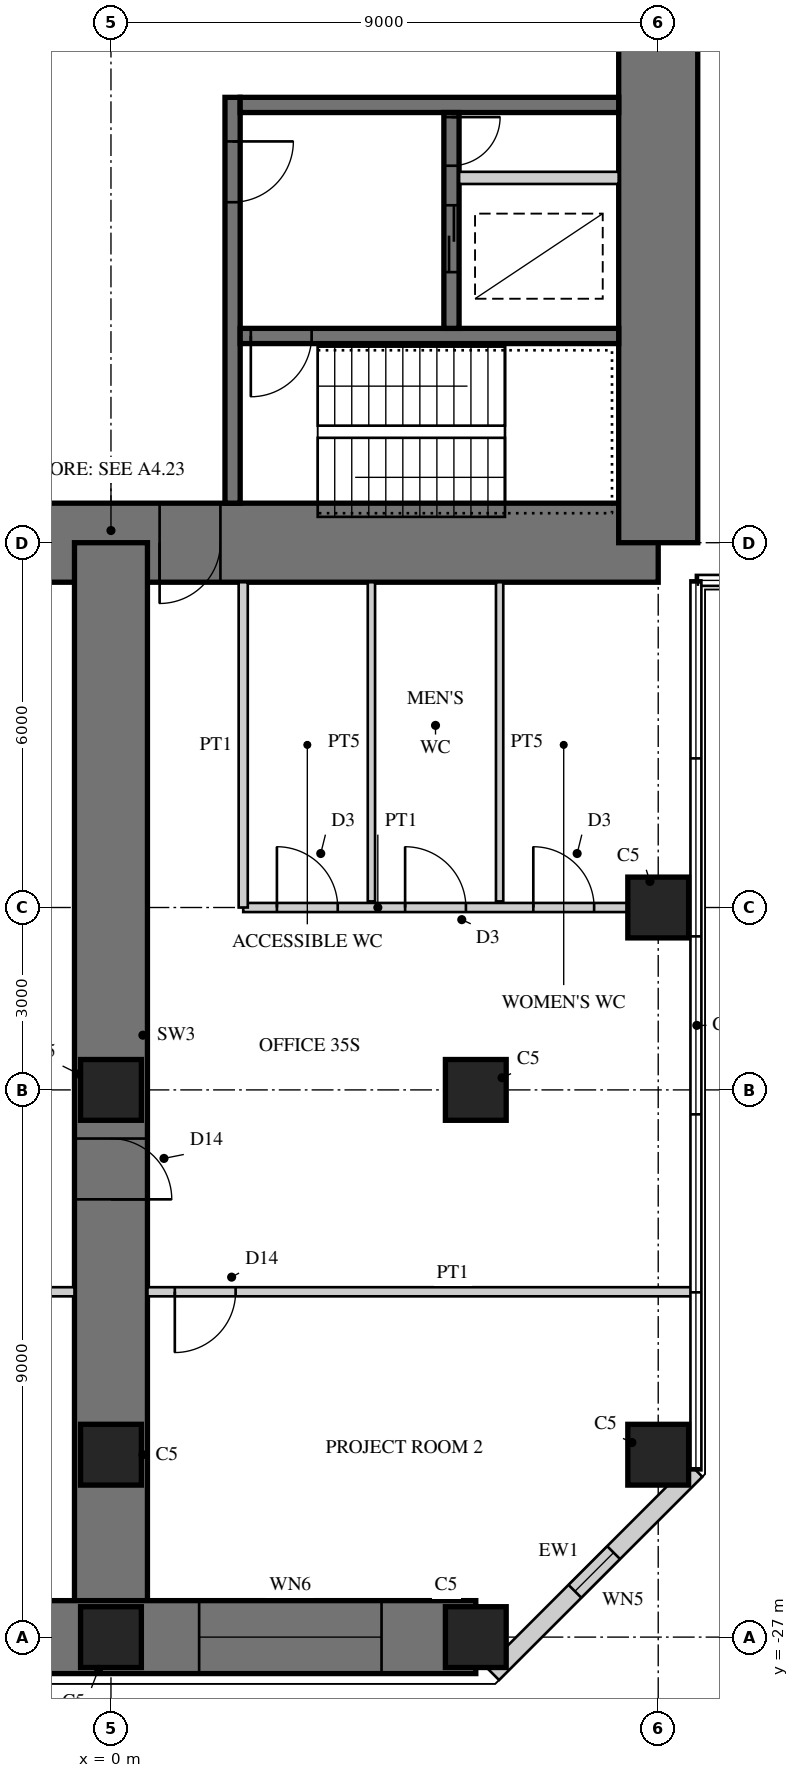
"""IFC4 building model, lengths in metres.
Left out: names, types, materials, properties, quantities, classifications, styles, units other than length and angle.
Written with IfcOpenShell. Run it as: python <this file> out.ifc"""

import sys

from ifc_helpers import new_model, si_unit, direction, frame, frame_2d, origin, origin_2d, place, context, subcontext, project, spatial, rectangle, hollow_rectangle, extrude, element, fill, save


model = new_model("IFC4")
c1 = context("Model", 3, precision=1e-05, world=origin(), true_north=direction((0.0, 1.0)))
c2 = subcontext(c1, "Body", "Model", "MODEL_VIEW")
j1 = project(units=[si_unit("LENGTHUNIT", "METRE"), si_unit("PLANEANGLEUNIT", "RADIAN")], contexts=[c1])
p1 = place(None, origin())
s1 = spatial("IfcSite", under=j1, at=p1, CompositionType="ELEMENT")
p2 = place(p1, origin())
s2 = spatial("IfcBuilding", under=s1, at=p2, CompositionType="ELEMENT")
p3 = place(p2, frame((0.0, 0.0, 144.5)))
s3 = spatial("IfcBuildingStorey", under=s2, at=p3, CompositionType="ELEMENT", Elevation=144.5)
p4 = place(p3, frame((-9.0, -9.0, 0.0), z_axis=(0.0, 0.0, 1.0), x_axis=(1.0, 0.0, 0.0)))
e1 = element("IfcWall", 1, at=p4, inside=s3, PredefinedType="SHEAR", context=c2, shape_type="SweptSolid", body=[
    extrude(rectangle(XDim=18.0, YDim=1.3, at=frame_2d((9.0, 0.0))), origin(), (0.0, 0.0, 1.0), 4.0),
])
p5 = place(p4, frame((9.8, 0.0, 0.0)))
e2 = element("IfcOpeningElement", 2, at=p5, cuts=e1, PredefinedType="OPENING", context=c2, shape_type="SweptSolid", body=[
    extrude(rectangle(XDim=1.0, YDim=2.4, at=frame_2d((0.5, 1.2))), frame((0.0, 0.66, 0.0), z_axis=(0.0, -1.0, 0.0), x_axis=(1.0, 0.0, 0.0)), (0.0, 0.0, 1.0), 1.32),
])
p6 = place(p3, frame((9.0, -9.0, 0.0), z_axis=(0.0, 0.0, 1.0), x_axis=(0.0, 1.0, 0.0)))
e3 = element("IfcWall", 3, at=p6, inside=s3, PredefinedType="SHEAR", context=c2, shape_type="SweptSolid", body=[
    extrude(rectangle(XDim=18.0, YDim=1.3, at=frame_2d((9.0, 0.0))), origin(), (0.0, 0.0, 1.0), 4.0),
])
p7 = place(p6, frame((9.8, 0.0, 0.0)))
e4 = element("IfcOpeningElement", 4, at=p7, cuts=e3, PredefinedType="OPENING", context=c2, shape_type="SweptSolid", body=[
    extrude(rectangle(XDim=1.0, YDim=2.4, at=frame_2d((0.5, 1.2))), frame((0.0, 0.66, 0.0), z_axis=(0.0, -1.0, 0.0), x_axis=(1.0, 0.0, 0.0)), (0.0, 0.0, 1.0), 1.32),
])
p8 = place(p3, frame((2.0, -1.675, 0.0), z_axis=(0.0, 0.0, 1.0), x_axis=(0.0, -1.0, 0.0)))
e5 = element("IfcWall", 5, at=p8, inside=s3, PredefinedType="SHEAR", context=c2, shape_type="SweptSolid", body=[
    extrude(rectangle(XDim=6.675, YDim=0.25, at=frame_2d((3.337, 0.0))), origin(), (0.0, 0.0, 1.0), 4.0),
])
p9 = place(p8, frame((0.725, 0.0, 0.0)))
e6 = element("IfcOpeningElement", 6, at=p9, cuts=e5, PredefinedType="OPENING", context=c2, shape_type="SweptSolid", body=[
    extrude(rectangle(XDim=1.0, YDim=2.1, at=frame_2d((0.5, 1.05))), frame((0.0, 0.135, 0.0), z_axis=(0.0, -1.0, 0.0), x_axis=(1.0, 0.0, 0.0)), (0.0, 0.0, 1.0), 0.27),
])
p10 = place(p3, frame((2.125, -1.8, 0.0), z_axis=(0.0, 0.0, 1.0), x_axis=(1.0, 0.0, 0.0)))
e7 = element("IfcWall", 7, at=p10, inside=s3, PredefinedType="SHEAR", context=c2, shape_type="SweptSolid", body=[
    extrude(rectangle(XDim=6.225, YDim=0.25, at=frame_2d((3.113, 0.0))), origin(), (0.0, 0.0, 1.0), 4.0),
])
p11 = place(p3, frame((2.125, -5.6, 0.0), z_axis=(0.0, 0.0, 1.0), x_axis=(1.0, 0.0, 0.0)))
e8 = element("IfcWall", 8, at=p11, inside=s3, PredefinedType="SHEAR", context=c2, shape_type="SweptSolid", body=[
    extrude(rectangle(XDim=6.225, YDim=0.25, at=frame_2d((3.113, 0.0))), origin(), (0.0, 0.0, 1.0), 4.0),
])
p12 = place(p11, frame((0.175, 0.0, 0.0)))
e9 = element("IfcOpeningElement", 9, at=p12, cuts=e8, PredefinedType="OPENING", context=c2, shape_type="SweptSolid", body=[
    extrude(rectangle(XDim=1.0, YDim=2.1, at=frame_2d((0.5, 1.05))), frame((0.0, 0.135, 0.0), z_axis=(0.0, -1.0, 0.0), x_axis=(1.0, 0.0, 0.0)), (0.0, 0.0, 1.0), 0.27),
])
p13 = place(p3, frame((5.6, -1.925, 0.0), z_axis=(0.0, 0.0, 1.0), x_axis=(0.0, -1.0, 0.0)))
e10 = element("IfcWall", 10, at=p13, inside=s3, PredefinedType="SHEAR", context=c2, shape_type="SweptSolid", body=[
    extrude(rectangle(XDim=3.55, YDim=0.25, at=frame_2d((1.775, 0.0))), origin(), (0.0, 0.0, 1.0), 4.0),
])
p14 = place(p13, frame((1.525, 0.0, 0.0)))
e11 = element("IfcOpeningElement", 11, at=p14, cuts=e10, PredefinedType="OPENING", context=c2, shape_type="SweptSolid", body=[
    extrude(rectangle(XDim=1.1, YDim=2.2, at=frame_2d((0.55, 1.1))), frame((0.0, 0.135, 0.0), z_axis=(0.0, -1.0, 0.0), x_axis=(1.0, 0.0, 0.0)), (0.0, 0.0, 1.0), 0.27),
])
p15 = place(p13, frame((0.075, 0.0, 0.0)))
e12 = element("IfcOpeningElement", 12, at=p15, cuts=e10, PredefinedType="OPENING", context=c2, shape_type="SweptSolid", body=[
    extrude(rectangle(XDim=0.8, YDim=2.1, at=frame_2d((0.4, 1.05))), frame((0.0, 0.135, 0.0), z_axis=(0.0, -1.0, 0.0), x_axis=(1.0, 0.0, 0.0)), (0.0, 0.0, 1.0), 0.27),
])
p16 = place(p3, frame((5.725, -3.0, 0.0), z_axis=(0.0, 0.0, 1.0), x_axis=(1.0, 0.0, 0.0)))
e13 = element("IfcWall", 13, at=p16, inside=s3, PredefinedType="PARTITIONING", context=c2, shape_type="SweptSolid", body=[
    extrude(rectangle(XDim=2.625, YDim=0.2, at=frame_2d((1.312, 0.0))), origin(), (0.0, 0.0, 1.0), 4.0),
])
p17 = place(p3, frame((0.0, -9.0, 0.0), z_axis=(0.0, 0.0, 1.0), x_axis=(0.0, -1.0, 0.0)))
e14 = element("IfcWall", 14, at=p17, inside=s3, PredefinedType="SHEAR", context=c2, shape_type="SweptSolid", body=[
    extrude(rectangle(XDim=18.0, YDim=1.2, at=frame_2d((9.0, 0.0))), origin(), (0.0, 0.0, 1.0), 4.0),
])
p18 = place(p17, frame((9.8, 0.0, 0.0)))
e15 = element("IfcOpeningElement", 15, at=p18, cuts=e14, PredefinedType="OPENING", context=c2, shape_type="SweptSolid", body=[
    extrude(rectangle(XDim=1.0, YDim=2.2, at=frame_2d((0.5, 1.1))), frame((0.0, 0.61, 0.0), z_axis=(0.0, -1.0, 0.0), x_axis=(1.0, 0.0, 0.0)), (0.0, 0.0, 1.0), 1.22),
])
p19 = place(p3, frame((-6.0, -27.0, 0.0), z_axis=(0.0, 0.0, 1.0), x_axis=(1.0, 0.0, 0.0)))
e16 = element("IfcWall", 16, at=p19, inside=s3, PredefinedType="SHEAR", context=c2, shape_type="SweptSolid", body=[
    extrude(rectangle(XDim=12.0, YDim=1.2, at=frame_2d((6.0, 0.0))), origin(), (0.0, 0.0, 1.0), 4.0),
])
p20 = place(p19, frame((1.55, 0.0, 0.6)))
e17 = element("IfcOpeningElement", 17, at=p20, cuts=e16, PredefinedType="OPENING", context=c2, shape_type="SweptSolid", body=[
    extrude(rectangle(XDim=3.0, YDim=2.4, at=frame_2d((1.5, 1.2))), frame((0.0, 0.61, 0.0), z_axis=(0.0, -1.0, 0.0), x_axis=(1.0, 0.0, 0.0)), (0.0, 0.0, 1.0), 1.22),
])
p21 = place(p19, frame((7.45, 0.0, 0.6)))
e18 = element("IfcOpeningElement", 18, at=p21, cuts=e16, PredefinedType="OPENING", context=c2, shape_type="SweptSolid", body=[
    extrude(rectangle(XDim=3.0, YDim=2.4, at=frame_2d((1.5, 1.2))), frame((0.0, 0.61, 0.0), z_axis=(0.0, -1.0, 0.0), x_axis=(1.0, 0.0, 0.0)), (0.0, 0.0, 1.0), 1.22),
])
for number, where, z_axis, x_axis in (
    (19, (9.0, -15.0, 0.0), (0.0, 0.0, 1.0), (1.0, 0.0, 0.0)),
    (20, (9.0, -24.0, 0.0), (0.0, 0.0, 1.0), (1.0, 0.0, 0.0)),
    (21, (0.0, -27.0, 0.0), (0.0, 0.0, 1.0), (1.0, 0.0, 0.0)),
    (22, (6.0, -27.0, 0.0), (0.0, 0.0, 1.0), (1.0, 0.0, 0.0)),
    (23, (0.0, -18.0, 0.0), (0.0, 0.0, 1.0), (1.0, 0.0, 0.0)),
    (24, (6.0, -18.0, 0.0), (0.0, 0.0, 1.0), (1.0, 0.0, 0.0)),
    (25, (0.0, -24.0, 0.0), (0.0, 0.0, 1.0), (1.0, 0.0, 0.0)),
):
    element("IfcColumn", number, at=place(p3, frame(where, z_axis=z_axis, x_axis=x_axis)), inside=s3, PredefinedType="COLUMN", context=c2, shape_type="SweptSolid", body=[
        extrude(rectangle(XDim=1.0, YDim=1.0, at=origin_2d()), origin(), (0.0, 0.0, 1.0), 4.0),
    ])
p22 = place(p3, frame((6.277, -27.6, 0.0), z_axis=(0.0, 0.0, 1.0), x_axis=(0.707106781187, 0.707106781187, 0.0)))
e26 = element("IfcWall", 26, at=p22, inside=s3, PredefinedType="SOLIDWALL", context=c2, shape_type="SweptSolid", body=[
    extrude(rectangle(XDim=4.728, YDim=0.3, at=frame_2d((2.364, 0.0))), origin(), (0.0, 0.0, 1.0), 3.8),
])
p23 = place(p22, frame((1.914, 0.0, 0.3)))
e27 = element("IfcOpeningElement", 27, at=p23, cuts=e26, PredefinedType="OPENING", context=c2, shape_type="SweptSolid", body=[
    extrude(rectangle(XDim=0.9, YDim=2.4, at=frame_2d((0.45, 1.2))), frame((0.0, 0.16, 0.0), z_axis=(0.0, -1.0, 0.0), x_axis=(1.0, 0.0, 0.0)), (0.0, 0.0, 1.0), 0.32),
])
p24 = place(p3, frame((2.175, -15.0, 0.0), z_axis=(0.0, 0.0, 1.0), x_axis=(1.0, 0.0, 0.0)))
e28 = element("IfcWall", 28, at=p24, inside=s3, PredefinedType="PARTITIONING", context=c2, shape_type="SweptSolid", body=[
    extrude(rectangle(XDim=6.325, YDim=0.15, at=frame_2d((3.163, 0.0))), origin(), (0.0, 0.0, 1.0), 3.0),
])
p25 = place(p24, frame((0.554, 0.0, 0.0)))
e29 = element("IfcOpeningElement", 29, at=p25, cuts=e28, PredefinedType="OPENING", context=c2, shape_type="SweptSolid", body=[
    extrude(rectangle(XDim=1.0, YDim=2.1, at=frame_2d((0.5, 1.05))), frame((0.0, 0.085, 0.0), z_axis=(0.0, -1.0, 0.0), x_axis=(1.0, 0.0, 0.0)), (0.0, 0.0, 1.0), 0.17),
])
p26 = place(p24, frame((2.663, 0.0, 0.0)))
e30 = element("IfcOpeningElement", 30, at=p26, cuts=e28, PredefinedType="OPENING", context=c2, shape_type="SweptSolid", body=[
    extrude(rectangle(XDim=1.0, YDim=2.1, at=frame_2d((0.5, 1.05))), frame((0.0, 0.085, 0.0), z_axis=(0.0, -1.0, 0.0), x_axis=(1.0, 0.0, 0.0)), (0.0, 0.0, 1.0), 0.17),
])
p27 = place(p24, frame((4.771, 0.0, 0.0)))
e31 = element("IfcOpeningElement", 31, at=p27, cuts=e28, PredefinedType="OPENING", context=c2, shape_type="SweptSolid", body=[
    extrude(rectangle(XDim=1.0, YDim=2.1, at=frame_2d((0.5, 1.05))), frame((0.0, 0.085, 0.0), z_axis=(0.0, -1.0, 0.0), x_axis=(1.0, 0.0, 0.0)), (0.0, 0.0, 1.0), 0.17),
])
p28 = place(p3, frame((2.175, -9.65, 0.0), z_axis=(0.0, 0.0, 1.0), x_axis=(0.0, -1.0, 0.0)))
e32 = element("IfcWall", 32, at=p28, inside=s3, PredefinedType="PARTITIONING", context=c2, shape_type="SweptSolid", body=[
    extrude(rectangle(XDim=5.35, YDim=0.15, at=frame_2d((2.675, 0.0))), origin(), (0.0, 0.0, 1.0), 3.8),
])
for number, where, z_axis, x_axis in (
    (33, (4.283, -9.65, 0.0), (0.0, 0.0, 1.0), (0.0, -1.0, 0.0)),
    (34, (6.392, -9.65, 0.0), (0.0, 0.0, 1.0), (0.0, -1.0, 0.0)),
):
    element("IfcWall", number, at=place(p3, frame(where, z_axis=z_axis, x_axis=x_axis)), inside=s3, PredefinedType="PLUMBINGWALL", context=c2, shape_type="SweptSolid", body=[
        extrude(rectangle(XDim=5.25, YDim=0.12, at=frame_2d((2.625, 0.0))), origin(), (0.0, 0.0, 1.0), 3.8),
    ])
p29 = place(p3, frame((0.6, -21.32, 0.0), z_axis=(0.0, 0.0, 1.0), x_axis=(1.0, 0.0, 0.0)))
e35 = element("IfcWall", 35, at=p29, inside=s3, PredefinedType="PARTITIONING", context=c2, shape_type="SweptSolid", body=[
    extrude(rectangle(XDim=8.98, YDim=0.15, at=frame_2d((4.49, 0.0))), origin(), (0.0, 0.0, 1.0), 3.8),
])
p30 = place(p29, frame((0.45, 0.0, 0.0)))
e36 = element("IfcOpeningElement", 36, at=p30, cuts=e35, PredefinedType="OPENING", context=c2, shape_type="SweptSolid", body=[
    extrude(rectangle(XDim=1.0, YDim=2.2, at=frame_2d((0.5, 1.1))), frame((0.0, 0.085, 0.0), z_axis=(0.0, -1.0, 0.0), x_axis=(1.0, 0.0, 0.0)), (0.0, 0.0, 1.0), 0.17),
])
p31 = place(p3, frame((-9.58, -21.32, 0.0), z_axis=(0.0, 0.0, 1.0), x_axis=(1.0, 0.0, 0.0)))
e37 = element("IfcWall", 37, at=p31, inside=s3, PredefinedType="PARTITIONING", context=c2, shape_type="SweptSolid", body=[
    extrude(rectangle(XDim=8.98, YDim=0.15, at=frame_2d((4.49, 0.0))), origin(), (0.0, 0.0, 1.0), 3.8),
])
p32 = place(p31, frame((7.53, 0.0, 0.0)))
e38 = element("IfcOpeningElement", 38, at=p32, cuts=e37, PredefinedType="OPENING", context=c2, shape_type="SweptSolid", body=[
    extrude(rectangle(XDim=1.0, YDim=2.2, at=frame_2d((0.5, 1.1))), frame((0.0, 0.085, 0.0), z_axis=(0.0, -1.0, 0.0), x_axis=(1.0, 0.0, 0.0)), (0.0, 0.0, 1.0), 0.17),
])
p33 = place(p21, origin())
e39 = element("IfcWindow", 39, at=p33, inside=s3, PartitioningType="SINGLE_PANEL", PredefinedType="WINDOW", context=c2, shape_type="SweptSolid", body=[
    extrude(hollow_rectangle(XDim=3.0, YDim=2.4, WallThickness=0.06, at=frame_2d((1.5, 1.2))), frame((0.0, 0.03, 0.0), z_axis=(0.0, -1.0, 0.0), x_axis=(1.0, 0.0, 0.0)), (0.0, 0.0, 1.0), 0.06),
    extrude(rectangle(XDim=2.879, YDim=2.279, at=frame_2d((1.5, 1.2))), frame((0.0, 0.03, 0.0), z_axis=(0.0, -1.0, 0.0), x_axis=(1.0, 0.0, 0.0)), (0.0, 0.0, 1.0), 0.06),
])
fill(e18, e39)
p34 = place(p23, origin())
e40 = element("IfcWindow", 40, at=p34, inside=s3, PartitioningType="SINGLE_PANEL", PredefinedType="WINDOW", context=c2, shape_type="SweptSolid", body=[
    extrude(hollow_rectangle(XDim=0.9, YDim=2.4, WallThickness=0.06, at=frame_2d((0.45, 1.2))), frame((0.0, 0.03, 0.0), z_axis=(0.0, -1.0, 0.0), x_axis=(1.0, 0.0, 0.0)), (0.0, 0.0, 1.0), 0.06),
    extrude(rectangle(XDim=0.779, YDim=2.279, at=frame_2d((0.45, 1.2))), frame((0.0, 0.03, 0.0), z_axis=(0.0, -1.0, 0.0), x_axis=(1.0, 0.0, 0.0)), (0.0, 0.0, 1.0), 0.06),
])
fill(e27, e40)
p35 = place(p25, origin())
e41 = element("IfcDoor", 41, at=p35, inside=s3, OperationType="SINGLE_SWING_LEFT", PredefinedType="DOOR", context=c2, shape_type="SweptSolid", body=[
    extrude(rectangle(XDim=1.0, YDim=2.1, at=frame_2d((0.5, 1.05))), frame((0.0, 0.025, 0.0), z_axis=(0.0, -1.0, 0.0), x_axis=(1.0, 0.0, 0.0)), (0.0, 0.0, 1.0), 0.05),
])
fill(e29, e41)
p36 = place(p26, origin())
e42 = element("IfcDoor", 42, at=p36, inside=s3, OperationType="SINGLE_SWING_LEFT", PredefinedType="DOOR", context=c2, shape_type="SweptSolid", body=[
    extrude(rectangle(XDim=1.0, YDim=2.1, at=frame_2d((0.5, 1.05))), frame((0.0, 0.025, 0.0), z_axis=(0.0, -1.0, 0.0), x_axis=(1.0, 0.0, 0.0)), (0.0, 0.0, 1.0), 0.05),
])
fill(e30, e42)
p37 = place(p27, origin())
e43 = element("IfcDoor", 43, at=p37, inside=s3, OperationType="SINGLE_SWING_LEFT", PredefinedType="DOOR", context=c2, shape_type="SweptSolid", body=[
    extrude(rectangle(XDim=1.0, YDim=2.1, at=frame_2d((0.5, 1.05))), frame((0.0, 0.025, 0.0), z_axis=(0.0, -1.0, 0.0), x_axis=(1.0, 0.0, 0.0)), (0.0, 0.0, 1.0), 0.05),
])
fill(e31, e43)
p38 = place(p30, frame((1.0, 0.0, 0.0), z_axis=(0.0, 0.0, 1.0), x_axis=(-1.0, 0.0, 0.0)))
e44 = element("IfcDoor", 44, at=p38, inside=s3, OperationType="SINGLE_SWING_RIGHT", PredefinedType="DOOR", context=c2, shape_type="SweptSolid", body=[
    extrude(rectangle(XDim=1.0, YDim=2.2, at=frame_2d((0.5, 1.1))), frame((0.0, 0.025, 0.0), z_axis=(0.0, -1.0, 0.0), x_axis=(1.0, 0.0, 0.0)), (0.0, 0.0, 1.0), 0.05),
])
fill(e36, e44)
p39 = place(p18, origin())
e45 = element("IfcDoor", 45, at=p39, inside=s3, OperationType="SINGLE_SWING_RIGHT", PredefinedType="DOOR", context=c2, shape_type="SweptSolid", body=[
    extrude(rectangle(XDim=1.0, YDim=2.2, at=frame_2d((0.5, 1.1))), frame((0.0, 0.025, 0.0), z_axis=(0.0, -1.0, 0.0), x_axis=(1.0, 0.0, 0.0)), (0.0, 0.0, 1.0), 0.05),
])
fill(e15, e45)
p40 = place(p5, frame((1.0, 0.0, 0.0), z_axis=(0.0, 0.0, 1.0), x_axis=(-1.0, 0.0, 0.0)))
e46 = element("IfcDoor", 46, at=p40, inside=s3, OperationType="SINGLE_SWING_RIGHT", PredefinedType="DOOR", context=c2, shape_type="SweptSolid", body=[
    extrude(rectangle(XDim=1.0, YDim=2.4, at=frame_2d((0.5, 1.2))), frame((0.0, -0.005, 0.0), z_axis=(0.0, -1.0, 0.0), x_axis=(1.0, 0.0, 0.0)), (0.0, 0.0, 1.0), 0.05),
])
fill(e2, e46)
p41 = place(p9, origin())
e47 = element("IfcDoor", 47, at=p41, inside=s3, OperationType="SINGLE_SWING_LEFT", PredefinedType="DOOR", context=c2, shape_type="SweptSolid", body=[
    extrude(rectangle(XDim=1.0, YDim=2.1, at=frame_2d((0.5, 1.05))), frame((0.0, 0.025, 0.0), z_axis=(0.0, -1.0, 0.0), x_axis=(1.0, 0.0, 0.0)), (0.0, 0.0, 1.0), 0.05),
])
fill(e6, e47)
p42 = place(p12, frame((1.0, 0.0, 0.0), z_axis=(0.0, 0.0, 1.0), x_axis=(-1.0, 0.0, 0.0)))
e48 = element("IfcDoor", 48, at=p42, inside=s3, OperationType="SINGLE_SWING_RIGHT", PredefinedType="DOOR", context=c2, shape_type="SweptSolid", body=[
    extrude(rectangle(XDim=1.0, YDim=2.1, at=frame_2d((0.5, 1.05))), frame((0.0, 0.025, 0.0), z_axis=(0.0, -1.0, 0.0), x_axis=(1.0, 0.0, 0.0)), (0.0, 0.0, 1.0), 0.05),
])
fill(e9, e48)
p43 = place(p14, origin())
e49 = element("IfcDoor", 49, at=p43, inside=s3, OperationType="DOUBLE_DOOR_SLIDING", PredefinedType="DOOR", context=c2, shape_type="SweptSolid", body=[
    extrude(rectangle(XDim=1.1, YDim=2.2, at=frame_2d((0.55, 1.1))), frame((0.0, 0.025, 0.0), z_axis=(0.0, -1.0, 0.0), x_axis=(1.0, 0.0, 0.0)), (0.0, 0.0, 1.0), 0.05),
])
fill(e11, e49)
p44 = place(p15, origin())
e50 = element("IfcDoor", 50, at=p44, inside=s3, OperationType="SINGLE_SWING_LEFT", PredefinedType="DOOR", context=c2, shape_type="SweptSolid", body=[
    extrude(rectangle(XDim=0.8, YDim=2.1, at=frame_2d((0.4, 1.05))), frame((0.0, 0.025, 0.0), z_axis=(0.0, -1.0, 0.0), x_axis=(1.0, 0.0, 0.0)), (0.0, 0.0, 1.0), 0.05),
])
fill(e12, e50)
save(model, sys.argv[1])
